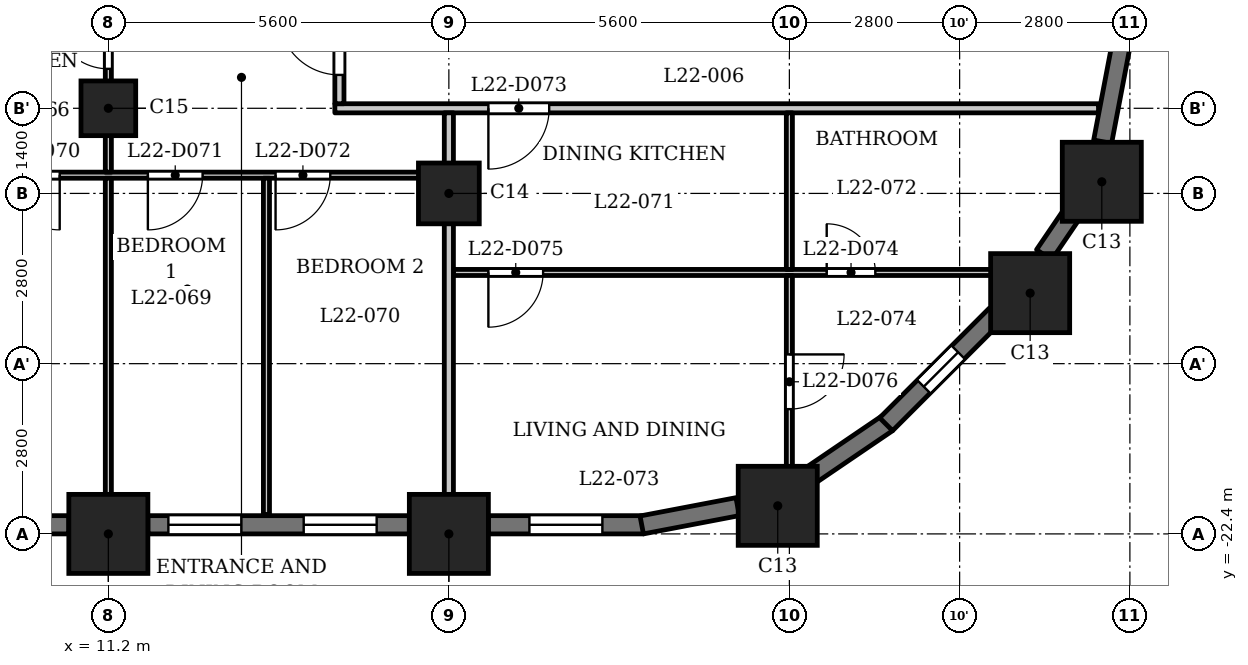
"""IFC4 building model, lengths in metres.
Left out: names, types, materials, properties, quantities, classifications, styles, units other than length and angle.
Written with IfcOpenShell. Run it as: python <this file> out.ifc"""

import sys

from ifc_helpers import new_model, si_unit, direction, frame, frame_2d, origin, origin_2d, place, context, subcontext, project, spatial, rectangle, extrude, element, fill, save


model = new_model("IFC4")
c1 = context("Model", 3, precision=1e-05, world=origin(), true_north=direction((0.0, 1.0)))
c2 = subcontext(c1, "Body", "Model", "MODEL_VIEW")
j1 = project(units=[si_unit("LENGTHUNIT", "METRE"), si_unit("PLANEANGLEUNIT", "RADIAN")], contexts=[c1])
p1 = place(None, origin())
s1 = spatial("IfcSite", under=j1, at=p1, CompositionType="ELEMENT")
p2 = place(p1, origin())
s2 = spatial("IfcBuilding", under=s1, at=p2, CompositionType="ELEMENT")
p3 = place(p2, frame((0.0, 0.0, 90.3)))
s3 = spatial("IfcBuildingStorey", under=s2, at=p3, CompositionType="ELEMENT", Elevation=90.3)
for number, where, z_axis, x_axis in (
    (1, (11.2, -22.4, 0.0), (0.0, 0.0, 1.0), (1.0, 0.0, 0.0)),
    (2, (16.8, -22.4, 0.0), (0.0, 0.0, 1.0), (1.0, 0.0, 0.0)),
    (3, (22.209, -21.938, 0.0), (0.0, 0.0, 1.0), (1.0, 0.0, 0.0)),
    (4, (26.36, -18.44, 0.0), (0.0, 0.0, 1.0), (1.0, 0.0, 0.0)),
    (5, (27.538, -16.609, 0.0), (0.0, 0.0, 1.0), (1.0, 0.0, 0.0)),
):
    element("IfcColumn", number, at=place(p3, frame(where, z_axis=z_axis, x_axis=x_axis)), inside=s3, PredefinedType="COLUMN", context=c2, shape_type="SweptSolid", body=[
        extrude(rectangle(XDim=1.3, YDim=1.3, at=origin_2d()), origin(), (0.0, 0.0, 1.0), 3.5),
    ])
p4 = place(p3, frame((16.8, -16.8, 0.0), z_axis=(0.0, 0.0, 1.0), x_axis=(1.0, 0.0, 0.0)))
e6 = element("IfcColumn", 6, at=p4, inside=s3, PredefinedType="COLUMN", context=c2, shape_type="SweptSolid", body=[
    extrude(rectangle(XDim=1.0, YDim=1.0, at=origin_2d()), origin(), (0.0, 0.0, 1.0), 3.5),
])
p5 = place(p3, frame((11.2, -15.4, 0.0), z_axis=(0.0, 0.0, 1.0), x_axis=(1.0, 0.0, 0.0)))
e7 = element("IfcColumn", 7, at=p5, inside=s3, PredefinedType="COLUMN", context=c2, shape_type="SweptSolid", body=[
    extrude(rectangle(XDim=0.9, YDim=0.9, at=origin_2d()), origin(), (0.0, 0.0, 1.0), 3.5),
])
p6 = place(p3, frame((6.25, -22.25, 0.0), z_axis=(0.0, 0.0, 1.0), x_axis=(1.0, 0.0, 0.0)))
e8 = element("IfcWall", 8, at=p6, inside=s3, PredefinedType="SOLIDWALL", context=c2, shape_type="SweptSolid", body=[
    extrude(rectangle(XDim=4.3, YDim=0.3, at=frame_2d((2.15, 0.0))), origin(), (0.0, 0.0, 1.0), 2.4),
])
p7 = place(p6, frame((0.35, 0.0, 1.2)))
e9 = element("IfcOpeningElement", 9, at=p7, cuts=e8, PredefinedType="OPENING", context=c2, shape_type="SweptSolid", body=[
    extrude(rectangle(XDim=3.6, YDim=0.95, at=frame_2d((1.8, 0.475))), frame((0.0, 0.16, 0.0), z_axis=(0.0, -1.0, 0.0), x_axis=(1.0, 0.0, 0.0)), (0.0, 0.0, 1.0), 0.32),
])
p8 = place(p3, frame((11.85, -22.25, 0.0), z_axis=(0.0, 0.0, 1.0), x_axis=(1.0, 0.0, 0.0)))
e10 = element("IfcWall", 10, at=p8, inside=s3, PredefinedType="SOLIDWALL", context=c2, shape_type="SweptSolid", body=[
    extrude(rectangle(XDim=4.3, YDim=0.3, at=frame_2d((2.15, 0.0))), origin(), (0.0, 0.0, 1.0), 2.4),
])
p9 = place(p8, frame((0.337, 0.0, 0.6)))
e11 = element("IfcOpeningElement", 11, at=p9, cuts=e10, PredefinedType="OPENING", context=c2, shape_type="SweptSolid", body=[
    extrude(rectangle(XDim=1.2, YDim=1.55, at=frame_2d((0.6, 0.775))), frame((0.0, 0.16, 0.0), z_axis=(0.0, -1.0, 0.0), x_axis=(1.0, 0.0, 0.0)), (0.0, 0.0, 1.0), 0.32),
])
p10 = place(p8, frame((2.562, 0.0, 0.6)))
e12 = element("IfcOpeningElement", 12, at=p10, cuts=e10, PredefinedType="OPENING", context=c2, shape_type="SweptSolid", body=[
    extrude(rectangle(XDim=1.2, YDim=1.55, at=frame_2d((0.6, 0.775))), frame((0.0, 0.16, 0.0), z_axis=(0.0, -1.0, 0.0), x_axis=(1.0, 0.0, 0.0)), (0.0, 0.0, 1.0), 0.32),
])
p11 = place(p3, frame((17.45, -22.25, 0.0), z_axis=(0.0, 0.0, 1.0), x_axis=(1.0, 0.0, 0.0)))
e13 = element("IfcWall", 13, at=p11, inside=s3, PredefinedType="SOLIDWALL", context=c2, shape_type="SweptSolid", body=[
    extrude(rectangle(XDim=2.55, YDim=0.3, at=frame_2d((1.275, 0.0))), origin(), (0.0, 0.0, 1.0), 2.4),
])
p12 = place(p11, frame((0.675, 0.0, 0.6)))
e14 = element("IfcOpeningElement", 14, at=p12, cuts=e13, PredefinedType="OPENING", context=c2, shape_type="SweptSolid", body=[
    extrude(rectangle(XDim=1.2, YDim=1.55, at=frame_2d((0.6, 0.775))), frame((0.0, 0.16, 0.0), z_axis=(0.0, -1.0, 0.0), x_axis=(1.0, 0.0, 0.0)), (0.0, 0.0, 1.0), 0.32),
])
for number, where, z_axis, x_axis in (
    (15, (19.972, -22.253, 0.0), (0.0, 0.0, 1.0), (0.982, 0.187, 0.0)),
    (16, (22.684, -21.482, 0.0), (0.0, 0.0, 1.0), (0.827, 0.562, 0.0)),
):
    element("IfcWall", number, at=place(p3, frame(where, z_axis=z_axis, x_axis=x_axis)), inside=s3, PredefinedType="SOLIDWALL", context=c2, shape_type="SweptSolid", body=[
        extrude(rectangle(XDim=1.606, YDim=0.3, at=frame_2d((0.803, 0.0))), origin(), (0.0, 0.0, 1.0), 2.4),
    ])
p13 = place(p3, frame((23.991, -20.597, 0.0), z_axis=(0.0, 0.0, 1.0), x_axis=(0.707106781187, 0.707106781187, 0.0)))
e17 = element("IfcWall", 17, at=p13, inside=s3, PredefinedType="SOLIDWALL", context=c2, shape_type="SweptSolid", body=[
    extrude(rectangle(XDim=2.55, YDim=0.3, at=frame_2d((1.275, 0.0))), origin(), (0.0, 0.0, 1.0), 2.4),
])
p14 = place(p13, frame((0.875, 0.0, 0.6)))
e18 = element("IfcOpeningElement", 18, at=p14, cuts=e17, PredefinedType="OPENING", context=c2, shape_type="SweptSolid", body=[
    extrude(rectangle(XDim=0.8, YDim=1.55, at=frame_2d((0.4, 0.775))), frame((0.0, 0.16, 0.0), z_axis=(0.0, -1.0, 0.0), x_axis=(1.0, 0.0, 0.0)), (0.0, 0.0, 1.0), 0.32),
])
p15 = place(p3, frame((26.589, -17.81, 0.0), z_axis=(0.0, 0.0, 1.0), x_axis=(0.562066330934, 0.827092159091, 0.0)))
e19 = element("IfcWall", 19, at=p15, inside=s3, PredefinedType="SOLIDWALL", context=c2, shape_type="SweptSolid", body=[
    extrude(rectangle(XDim=0.877, YDim=0.3, at=frame_2d((0.438, 0.0))), origin(), (0.0, 0.0, 1.0), 3.2),
])
p16 = place(p3, frame((27.552, -15.949, 0.0), z_axis=(0.0, 0.0, 1.0), x_axis=(0.187279751651, 0.982306619453, 0.0)))
e20 = element("IfcWall", 20, at=p16, inside=s3, PredefinedType="SOLIDWALL", context=c2, shape_type="SweptSolid", body=[
    extrude(rectangle(XDim=1.606, YDim=0.3, at=frame_2d((0.803, 0.0))), origin(), (0.0, 0.0, 1.0), 2.4),
])
p17 = place(p3, frame((16.875, -18.1, 0.0), z_axis=(0.0, 0.0, 1.0), x_axis=(1.0, 0.0, 0.0)))
e21 = element("IfcWall", 21, at=p17, inside=s3, PredefinedType="PARTITIONING", context=c2, shape_type="SweptSolid", body=[
    extrude(rectangle(XDim=9.565, YDim=0.1, at=frame_2d((4.782, 0.0))), origin(), (0.0, 0.0, 1.0), 3.2),
])
p18 = place(p17, frame((6.139, 0.0, 0.0)))
e22 = element("IfcOpeningElement", 22, at=p18, cuts=e21, PredefinedType="OPENING", context=c2, shape_type="SweptSolid", body=[
    extrude(rectangle(XDim=0.8, YDim=2.1, at=frame_2d((0.4, 1.05))), frame((0.0, 0.06, 0.0), z_axis=(0.0, -1.0, 0.0), x_axis=(1.0, 0.0, 0.0)), (0.0, 0.0, 1.0), 0.12),
])
p19 = place(p17, frame((0.575, 0.0, 0.0)))
e23 = element("IfcOpeningElement", 23, at=p19, cuts=e21, PredefinedType="OPENING", context=c2, shape_type="SweptSolid", body=[
    extrude(rectangle(XDim=0.9, YDim=2.1, at=frame_2d((0.45, 1.05))), frame((0.0, 0.06, 0.0), z_axis=(0.0, -1.0, 0.0), x_axis=(1.0, 0.0, 0.0)), (0.0, 0.0, 1.0), 0.12),
])
p20 = place(p3, frame((-16.725, -16.5, 0.0), z_axis=(0.0, 0.0, 1.0), x_axis=(1.0, 0.0, 0.0)))
e24 = element("IfcWall", 24, at=p20, inside=s3, PredefinedType="PARTITIONING", context=c2, shape_type="SweptSolid", body=[
    extrude(rectangle(XDim=33.45, YDim=0.1, at=frame_2d((16.725, 0.0))), origin(), (0.0, 0.0, 1.0), 3.2),
])
p21 = place(p20, frame((3.825, 0.0, 0.0)))
e25 = element("IfcOpeningElement", 25, at=p21, cuts=e24, PredefinedType="OPENING", context=c2, shape_type="SweptSolid", body=[
    extrude(rectangle(XDim=0.8, YDim=2.1, at=frame_2d((0.4, 1.05))), frame((0.0, 0.06, 0.0), z_axis=(0.0, -1.0, 0.0), x_axis=(1.0, 0.0, 0.0)), (0.0, 0.0, 1.0), 0.12),
])
p22 = place(p20, frame((1.825, 0.0, 0.0)))
e26 = element("IfcOpeningElement", 26, at=p22, cuts=e24, PredefinedType="OPENING", context=c2, shape_type="SweptSolid", body=[
    extrude(rectangle(XDim=0.9, YDim=2.1, at=frame_2d((0.45, 1.05))), frame((0.0, 0.06, 0.0), z_axis=(0.0, -1.0, 0.0), x_axis=(1.0, 0.0, 0.0)), (0.0, 0.0, 1.0), 0.12),
])
p23 = place(p20, frame((9.675, 0.0, 0.0)))
e27 = element("IfcOpeningElement", 27, at=p23, cuts=e24, PredefinedType="OPENING", context=c2, shape_type="SweptSolid", body=[
    extrude(rectangle(XDim=0.8, YDim=2.1, at=frame_2d((0.4, 1.05))), frame((0.0, 0.06, 0.0), z_axis=(0.0, -1.0, 0.0), x_axis=(1.0, 0.0, 0.0)), (0.0, 0.0, 1.0), 0.12),
])
p24 = place(p20, frame((6.425, 0.0, 0.0)))
e28 = element("IfcOpeningElement", 28, at=p24, cuts=e24, PredefinedType="OPENING", context=c2, shape_type="SweptSolid", body=[
    extrude(rectangle(XDim=0.9, YDim=2.1, at=frame_2d((0.45, 1.05))), frame((0.0, 0.06, 0.0), z_axis=(0.0, -1.0, 0.0), x_axis=(1.0, 0.0, 0.0)), (0.0, 0.0, 1.0), 0.12),
])
p25 = place(p20, frame((15.275, 0.0, 0.0)))
e29 = element("IfcOpeningElement", 29, at=p25, cuts=e24, PredefinedType="OPENING", context=c2, shape_type="SweptSolid", body=[
    extrude(rectangle(XDim=0.8, YDim=2.1, at=frame_2d((0.4, 1.05))), frame((0.0, 0.06, 0.0), z_axis=(0.0, -1.0, 0.0), x_axis=(1.0, 0.0, 0.0)), (0.0, 0.0, 1.0), 0.12),
])
p26 = place(p20, frame((12.025, 0.0, 0.0)))
e30 = element("IfcOpeningElement", 30, at=p26, cuts=e24, PredefinedType="OPENING", context=c2, shape_type="SweptSolid", body=[
    extrude(rectangle(XDim=0.9, YDim=2.1, at=frame_2d((0.45, 1.05))), frame((0.0, 0.06, 0.0), z_axis=(0.0, -1.0, 0.0), x_axis=(1.0, 0.0, 0.0)), (0.0, 0.0, 1.0), 0.12),
])
p27 = place(p20, frame((20.875, 0.0, 0.0)))
e31 = element("IfcOpeningElement", 31, at=p27, cuts=e24, PredefinedType="OPENING", context=c2, shape_type="SweptSolid", body=[
    extrude(rectangle(XDim=0.8, YDim=2.1, at=frame_2d((0.4, 1.05))), frame((0.0, 0.06, 0.0), z_axis=(0.0, -1.0, 0.0), x_axis=(1.0, 0.0, 0.0)), (0.0, 0.0, 1.0), 0.12),
])
p28 = place(p20, frame((18.625, 0.0, 0.0)))
e32 = element("IfcOpeningElement", 32, at=p28, cuts=e24, PredefinedType="OPENING", context=c2, shape_type="SweptSolid", body=[
    extrude(rectangle(XDim=0.9, YDim=2.1, at=frame_2d((0.45, 1.05))), frame((0.0, 0.06, 0.0), z_axis=(0.0, -1.0, 0.0), x_axis=(1.0, 0.0, 0.0)), (0.0, 0.0, 1.0), 0.12),
])
p29 = place(p20, frame((23.875, 0.0, 0.0)))
e33 = element("IfcOpeningElement", 33, at=p29, cuts=e24, PredefinedType="OPENING", context=c2, shape_type="SweptSolid", body=[
    extrude(rectangle(XDim=0.8, YDim=2.1, at=frame_2d((0.4, 1.05))), frame((0.0, 0.06, 0.0), z_axis=(0.0, -1.0, 0.0), x_axis=(1.0, 0.0, 0.0)), (0.0, 0.0, 1.0), 0.12),
])
p30 = place(p20, frame((26.225, 0.0, 0.0)))
e34 = element("IfcOpeningElement", 34, at=p30, cuts=e24, PredefinedType="OPENING", context=c2, shape_type="SweptSolid", body=[
    extrude(rectangle(XDim=0.9, YDim=2.1, at=frame_2d((0.45, 1.05))), frame((0.0, 0.06, 0.0), z_axis=(0.0, -1.0, 0.0), x_axis=(1.0, 0.0, 0.0)), (0.0, 0.0, 1.0), 0.12),
])
p31 = place(p20, frame((28.575, 0.0, 0.0)))
e35 = element("IfcOpeningElement", 35, at=p31, cuts=e24, PredefinedType="OPENING", context=c2, shape_type="SweptSolid", body=[
    extrude(rectangle(XDim=0.9, YDim=2.1, at=frame_2d((0.45, 1.05))), frame((0.0, 0.06, 0.0), z_axis=(0.0, -1.0, 0.0), x_axis=(1.0, 0.0, 0.0)), (0.0, 0.0, 1.0), 0.12),
])
p32 = place(p20, frame((30.675, 0.0, 0.0)))
e36 = element("IfcOpeningElement", 36, at=p32, cuts=e24, PredefinedType="OPENING", context=c2, shape_type="SweptSolid", body=[
    extrude(rectangle(XDim=0.9, YDim=2.1, at=frame_2d((0.45, 1.05))), frame((0.0, 0.06, 0.0), z_axis=(0.0, -1.0, 0.0), x_axis=(1.0, 0.0, 0.0)), (0.0, 0.0, 1.0), 0.12),
])
p33 = place(p3, frame((14.925, -15.4, 0.0), z_axis=(0.0, 0.0, 1.0), x_axis=(1.0, 0.0, 0.0)))
e37 = element("IfcWall", 37, at=p33, inside=s3, PredefinedType="PARTITIONING", context=c2, shape_type="SweptSolid", body=[
    extrude(rectangle(XDim=12.559, YDim=0.15, at=frame_2d((6.279, 0.0))), origin(), (0.0, 0.0, 1.0), 3.2),
])
p34 = place(p33, frame((2.525, 0.0, 0.0)))
e38 = element("IfcOpeningElement", 38, at=p34, cuts=e37, PredefinedType="OPENING", context=c2, shape_type="SweptSolid", body=[
    extrude(rectangle(XDim=1.0, YDim=2.1, at=frame_2d((0.5, 1.05))), frame((0.0, 0.085, 0.0), z_axis=(0.0, -1.0, 0.0), x_axis=(1.0, 0.0, 0.0)), (0.0, 0.0, 1.0), 0.17),
])
p35 = place(p3, frame((11.2, -23.03, 0.0), z_axis=(0.0, 0.0, 1.0), x_axis=(0.0, 1.0, 0.0)))
e39 = element("IfcWall", 39, at=p35, inside=s3, PredefinedType="PARTITIONING", context=c2, shape_type="SweptSolid", body=[
    extrude(rectangle(XDim=6.48, YDim=0.1, at=frame_2d((3.24, 0.0))), origin(), (0.0, 0.0, 1.0), 3.2),
])
p36 = place(p3, frame((11.2, -16.45, 0.0), z_axis=(0.0, 0.0, 1.0), x_axis=(0.0, 1.0, 0.0)))
e40 = element("IfcWall", 40, at=p36, inside=s3, PredefinedType="PARTITIONING", context=c2, shape_type="SweptSolid", body=[
    extrude(rectangle(XDim=3.175, YDim=0.1, at=frame_2d((1.587, 0.0))), origin(), (0.0, 0.0, 1.0), 3.2),
])
p37 = place(p36, frame((1.699, 0.0, 0.0)))
e41 = element("IfcOpeningElement", 41, at=p37, cuts=e40, PredefinedType="OPENING", context=c2, shape_type="SweptSolid", body=[
    extrude(rectangle(XDim=0.9, YDim=2.1, at=frame_2d((0.45, 1.05))), frame((0.0, 0.06, 0.0), z_axis=(0.0, -1.0, 0.0), x_axis=(1.0, 0.0, 0.0)), (0.0, 0.0, 1.0), 0.12),
])
p38 = place(p3, frame((13.8, -22.08, 0.0), z_axis=(0.0, 0.0, 1.0), x_axis=(0.0, 1.0, 0.0)))
e42 = element("IfcWall", 42, at=p38, inside=s3, PredefinedType="PARTITIONING", context=c2, shape_type="SweptSolid", body=[
    extrude(rectangle(XDim=5.53, YDim=0.1, at=frame_2d((2.765, 0.0))), origin(), (0.0, 0.0, 1.0), 3.2),
])
p39 = place(p3, frame((15.0, -15.325, 0.0), z_axis=(0.0, 0.0, 1.0), x_axis=(0.0, 1.0, 0.0)))
e43 = element("IfcWall", 43, at=p39, inside=s3, PredefinedType="PARTITIONING", context=c2, shape_type="SweptSolid", body=[
    extrude(rectangle(XDim=2.05, YDim=0.15, at=frame_2d((1.025, 0.0))), origin(), (0.0, 0.0, 1.0), 3.2),
])
p40 = place(p39, frame((0.474, 0.0, 0.0)))
e44 = element("IfcOpeningElement", 44, at=p40, cuts=e43, PredefinedType="OPENING", context=c2, shape_type="SweptSolid", body=[
    extrude(rectangle(XDim=1.0, YDim=2.1, at=frame_2d((0.5, 1.05))), frame((0.0, 0.085, 0.0), z_axis=(0.0, -1.0, 0.0), x_axis=(1.0, 0.0, 0.0)), (0.0, 0.0, 1.0), 0.17),
])
p41 = place(p3, frame((16.8, -23.03, 0.0), z_axis=(0.0, 0.0, 1.0), x_axis=(0.0, 1.0, 0.0)))
e45 = element("IfcWall", 45, at=p41, inside=s3, PredefinedType="PARTITIONING", context=c2, shape_type="SweptSolid", body=[
    extrude(rectangle(XDim=7.555, YDim=0.15, at=frame_2d((3.777, 0.0))), origin(), (0.0, 0.0, 1.0), 3.2),
])
p42 = place(p3, frame((22.4, -21.72, 0.0), z_axis=(0.0, 0.0, 1.0), x_axis=(0.0, 1.0, 0.0)))
e46 = element("IfcWall", 46, at=p42, inside=s3, PredefinedType="PARTITIONING", context=c2, shape_type="SweptSolid", body=[
    extrude(rectangle(XDim=3.57, YDim=0.1, at=frame_2d((1.785, 0.0))), origin(), (0.0, 0.0, 1.0), 3.2),
])
p43 = place(p42, frame((1.372, 0.0, 0.0)))
e47 = element("IfcOpeningElement", 47, at=p43, cuts=e46, PredefinedType="OPENING", context=c2, shape_type="SweptSolid", body=[
    extrude(rectangle(XDim=0.9, YDim=2.1, at=frame_2d((0.45, 1.05))), frame((0.0, 0.06, 0.0), z_axis=(0.0, -1.0, 0.0), x_axis=(1.0, 0.0, 0.0)), (0.0, 0.0, 1.0), 0.12),
])
p44 = place(p3, frame((22.4, -18.05, 0.0), z_axis=(0.0, 0.0, 1.0), x_axis=(0.0, 1.0, 0.0)))
e48 = element("IfcWall", 48, at=p44, inside=s3, PredefinedType="PARTITIONING", context=c2, shape_type="SweptSolid", body=[
    extrude(rectangle(XDim=2.575, YDim=0.1, at=frame_2d((1.288, 0.0))), origin(), (0.0, 0.0, 1.0), 3.2),
])
p45 = place(p40, origin())
e49 = element("IfcDoor", 49, at=p45, inside=s3, OperationType="SINGLE_SWING_LEFT", PredefinedType="DOOR", context=c2, shape_type="SweptSolid", body=[
    extrude(rectangle(XDim=1.0, YDim=2.1, at=frame_2d((0.5, 1.05))), frame((0.0, 0.025, 0.0), z_axis=(0.0, -1.0, 0.0), x_axis=(1.0, 0.0, 0.0)), (0.0, 0.0, 1.0), 0.05),
])
fill(e44, e49)
p46 = place(p37, origin())
e50 = element("IfcDoor", 50, at=p46, inside=s3, OperationType="SINGLE_SWING_LEFT", PredefinedType="DOOR", context=c2, shape_type="SweptSolid", body=[
    extrude(rectangle(XDim=0.9, YDim=2.1, at=frame_2d((0.45, 1.05))), frame((0.0, 0.025, 0.0), z_axis=(0.0, -1.0, 0.0), x_axis=(1.0, 0.0, 0.0)), (0.0, 0.0, 1.0), 0.05),
])
fill(e41, e50)
p47 = place(p30, origin())
e51 = element("IfcDoor", 51, at=p47, inside=s3, OperationType="SINGLE_SWING_RIGHT", PredefinedType="DOOR", context=c2, shape_type="SweptSolid", body=[
    extrude(rectangle(XDim=0.9, YDim=2.1, at=frame_2d((0.45, 1.05))), frame((0.0, 0.025, 0.0), z_axis=(0.0, -1.0, 0.0), x_axis=(1.0, 0.0, 0.0)), (0.0, 0.0, 1.0), 0.05),
])
fill(e34, e51)
p48 = place(p31, origin())
e52 = element("IfcDoor", 52, at=p48, inside=s3, OperationType="SINGLE_SWING_LEFT", PredefinedType="DOOR", context=c2, shape_type="SweptSolid", body=[
    extrude(rectangle(XDim=0.9, YDim=2.1, at=frame_2d((0.45, 1.05))), frame((0.0, 0.025, 0.0), z_axis=(0.0, -1.0, 0.0), x_axis=(1.0, 0.0, 0.0)), (0.0, 0.0, 1.0), 0.05),
])
fill(e35, e52)
p49 = place(p32, origin())
e53 = element("IfcDoor", 53, at=p49, inside=s3, OperationType="SINGLE_SWING_LEFT", PredefinedType="DOOR", context=c2, shape_type="SweptSolid", body=[
    extrude(rectangle(XDim=0.9, YDim=2.1, at=frame_2d((0.45, 1.05))), frame((0.0, 0.025, 0.0), z_axis=(0.0, -1.0, 0.0), x_axis=(1.0, 0.0, 0.0)), (0.0, 0.0, 1.0), 0.05),
])
fill(e36, e53)
p50 = place(p34, origin())
e54 = element("IfcDoor", 54, at=p50, inside=s3, OperationType="SINGLE_SWING_LEFT", PredefinedType="DOOR", context=c2, shape_type="SweptSolid", body=[
    extrude(rectangle(XDim=1.0, YDim=2.1, at=frame_2d((0.5, 1.05))), frame((0.0, 0.025, 0.0), z_axis=(0.0, -1.0, 0.0), x_axis=(1.0, 0.0, 0.0)), (0.0, 0.0, 1.0), 0.05),
])
fill(e38, e54)
p51 = place(p18, origin())
e55 = element("IfcDoor", 55, at=p51, inside=s3, OperationType="SINGLE_SWING_RIGHT", PredefinedType="DOOR", context=c2, shape_type="SweptSolid", body=[
    extrude(rectangle(XDim=0.8, YDim=2.1, at=frame_2d((0.4, 1.05))), frame((0.0, 0.025, 0.0), z_axis=(0.0, -1.0, 0.0), x_axis=(1.0, 0.0, 0.0)), (0.0, 0.0, 1.0), 0.05),
])
fill(e22, e55)
p52 = place(p19, origin())
e56 = element("IfcDoor", 56, at=p52, inside=s3, OperationType="SINGLE_SWING_LEFT", PredefinedType="DOOR", context=c2, shape_type="SweptSolid", body=[
    extrude(rectangle(XDim=0.9, YDim=2.1, at=frame_2d((0.45, 1.05))), frame((0.0, 0.025, 0.0), z_axis=(0.0, -1.0, 0.0), x_axis=(1.0, 0.0, 0.0)), (0.0, 0.0, 1.0), 0.05),
])
fill(e23, e56)
p53 = place(p43, origin())
e57 = element("IfcDoor", 57, at=p53, inside=s3, OperationType="SINGLE_SWING_RIGHT", PredefinedType="DOOR", context=c2, shape_type="SweptSolid", body=[
    extrude(rectangle(XDim=0.9, YDim=2.1, at=frame_2d((0.45, 1.05))), frame((0.0, 0.025, 0.0), z_axis=(0.0, -1.0, 0.0), x_axis=(1.0, 0.0, 0.0)), (0.0, 0.0, 1.0), 0.05),
])
fill(e47, e57)
p54 = place(p9, origin())
e58 = element("IfcWindow", 58, at=p54, inside=s3, PartitioningType="SINGLE_PANEL", PredefinedType="WINDOW", context=c2, shape_type="SweptSolid", body=[
    extrude(rectangle(XDim=1.2, YDim=1.55, at=frame_2d((0.6, 0.775))), frame((0.0, 0.03, 0.0), z_axis=(0.0, -1.0, 0.0), x_axis=(1.0, 0.0, 0.0)), (0.0, 0.0, 1.0), 0.06),
])
fill(e11, e58)
p55 = place(p10, origin())
e59 = element("IfcWindow", 59, at=p55, inside=s3, PartitioningType="SINGLE_PANEL", PredefinedType="WINDOW", context=c2, shape_type="SweptSolid", body=[
    extrude(rectangle(XDim=1.2, YDim=1.55, at=frame_2d((0.6, 0.775))), frame((0.0, 0.03, 0.0), z_axis=(0.0, -1.0, 0.0), x_axis=(1.0, 0.0, 0.0)), (0.0, 0.0, 1.0), 0.06),
])
fill(e12, e59)
p56 = place(p12, origin())
e60 = element("IfcWindow", 60, at=p56, inside=s3, PartitioningType="SINGLE_PANEL", PredefinedType="WINDOW", context=c2, shape_type="SweptSolid", body=[
    extrude(rectangle(XDim=1.2, YDim=1.55, at=frame_2d((0.6, 0.775))), frame((0.0, 0.03, 0.0), z_axis=(0.0, -1.0, 0.0), x_axis=(1.0, 0.0, 0.0)), (0.0, 0.0, 1.0), 0.06),
])
fill(e14, e60)
p57 = place(p14, origin())
e61 = element("IfcWindow", 61, at=p57, inside=s3, PartitioningType="SINGLE_PANEL", PredefinedType="WINDOW", context=c2, shape_type="SweptSolid", body=[
    extrude(rectangle(XDim=0.8, YDim=1.55, at=frame_2d((0.4, 0.775))), frame((0.0, 0.03, 0.0), z_axis=(0.0, -1.0, 0.0), x_axis=(1.0, 0.0, 0.0)), (0.0, 0.0, 1.0), 0.06),
])
fill(e18, e61)
save(model, sys.argv[1])
